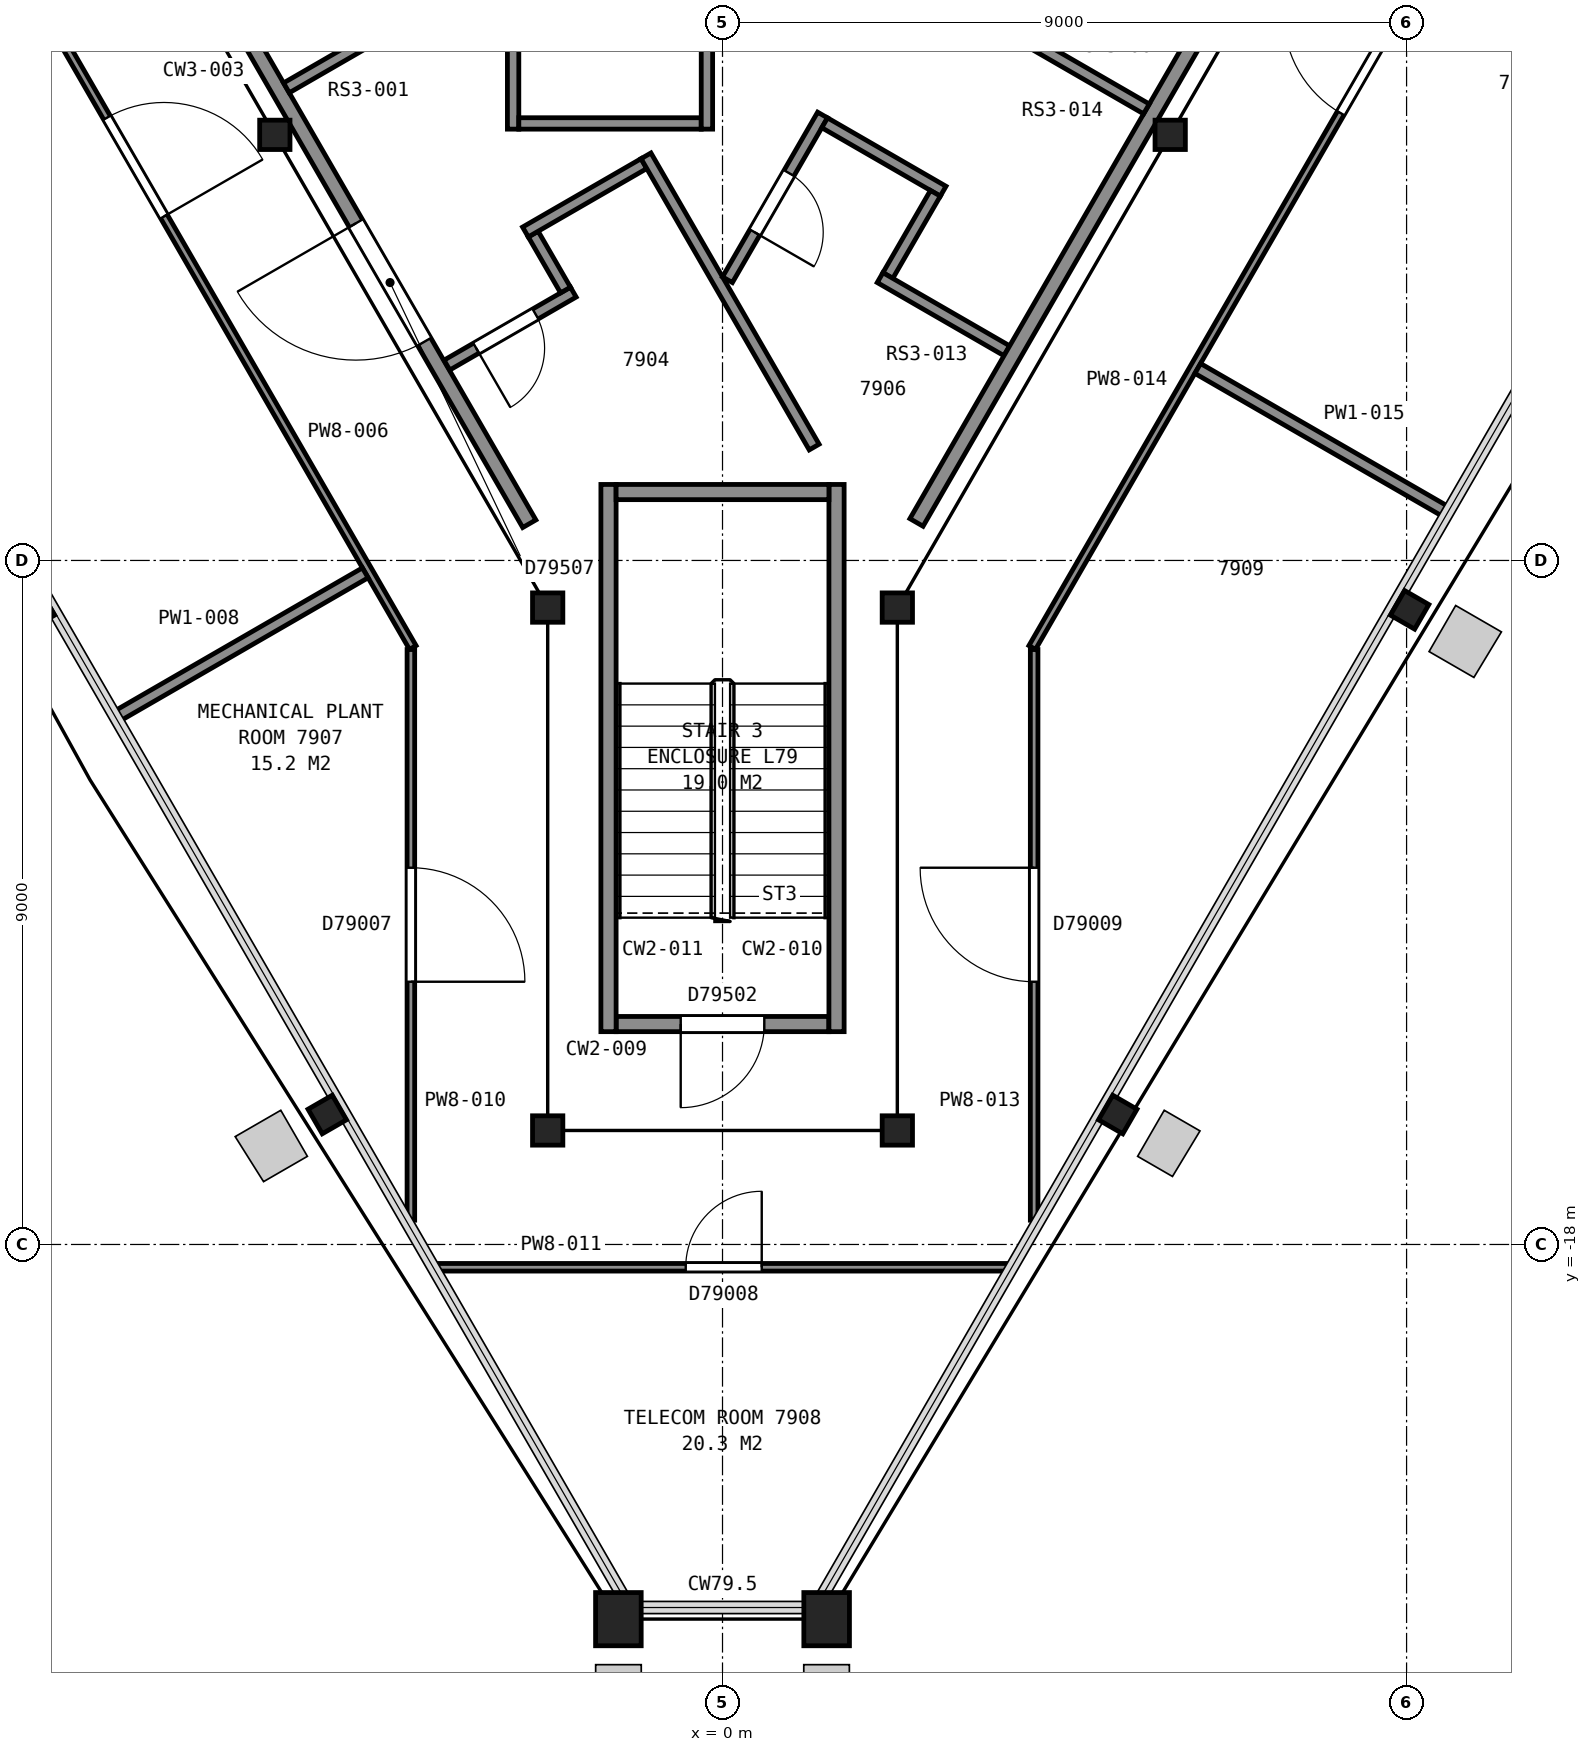
"""IFC4 building model, lengths in metres.
Left out: names, types, materials, properties, quantities, classifications, styles, units other than length and angle.
Written with IfcOpenShell. Run it as: python <this file> out.ifc"""

import sys

from ifc_helpers import new_model, si_unit, direction, frame, frame_2d, origin, origin_2d, place, context, subcontext, project, spatial, rectangle, hollow_rectangle, i_section, extrude, element, fill, save


model = new_model("IFC4")
c1 = context("Model", 3, precision=1e-05, world=origin(), true_north=direction((0.0, 1.0)))
c2 = subcontext(c1, "Body", "Model", "MODEL_VIEW")
j1 = project(units=[si_unit("LENGTHUNIT", "METRE"), si_unit("PLANEANGLEUNIT", "RADIAN")], contexts=[c1])
p1 = place(None, origin())
s1 = spatial("IfcSite", under=j1, at=p1, CompositionType="ELEMENT")
p2 = place(p1, origin())
s2 = spatial("IfcBuilding", under=s1, at=p2, CompositionType="ELEMENT")
p3 = place(p2, frame((0.0, 0.0, 312.6)))
s3 = spatial("IfcBuildingStorey", under=s2, at=p3, CompositionType="ELEMENT", Elevation=312.6)
for number, where, z_axis, x_axis in (
    (1, (-9.04, -9.65, 0.0), (0.0, 0.0, 1.0), (-0.5, 0.866, 0.0)),
    (2, (-5.2, -16.29, 0.0), (0.0, 0.0, 1.0), (-0.5, 0.866, 0.0)),
):
    element("IfcColumn", number, at=place(p3, frame(where, z_axis=z_axis, x_axis=x_axis)), inside=s3, PredefinedType="COLUMN", context=c2, shape_type="SweptSolid", body=[
        extrude(i_section(OverallWidth=0.373, OverallDepth=0.368, WebThickness=0.015, FlangeThickness=0.024, FilletRadius=0.015, at=origin_2d()), origin(), (0.0, 0.0, 1.0), 4.2),
    ])
for number, where, z_axis, x_axis in (
    (3, (-1.37, -22.93, 0.0), (0.0, 0.0, 1.0), (-1.0, 0.0, 0.0)),
    (4, (1.37, -22.93, 0.0), (0.0, 0.0, 1.0), (-1.0, 0.0, 0.0)),
):
    element("IfcColumn", number, at=place(p3, frame(where, z_axis=z_axis, x_axis=x_axis)), inside=s3, PredefinedType="COLUMN", context=c2, shape_type="SweptSolid", body=[
        extrude(hollow_rectangle(XDim=0.6, YDim=0.7, WallThickness=0.04, at=origin_2d()), origin(), (0.0, 0.0, 1.0), 4.2),
    ])
for number, where, z_axis, x_axis in (
    (5, (5.2, -16.29, 0.0), (0.0, 0.0, 1.0), (-0.5, -0.866, 0.0)),
    (6, (9.04, -9.65, 0.0), (0.0, 0.0, 1.0), (-0.5, -0.866, 0.0)),
):
    element("IfcColumn", number, at=place(p3, frame(where, z_axis=z_axis, x_axis=x_axis)), inside=s3, PredefinedType="COLUMN", context=c2, shape_type="SweptSolid", body=[
        extrude(i_section(OverallWidth=0.373, OverallDepth=0.368, WebThickness=0.015, FlangeThickness=0.024, FilletRadius=0.015, at=origin_2d()), origin(), (0.0, 0.0, 1.0), 4.2),
    ])
for number, where, z_axis, x_axis in (
    (7, (-5.89, -3.4, 0.0), (0.0, 0.0, 1.0), (1.0, 0.0, 0.0)),
    (8, (-2.3, -9.62, 0.0), (0.0, 0.0, 1.0), (1.0, 0.0, 0.0)),
    (9, (-2.3, -16.5, 0.0), (0.0, 0.0, 1.0), (-1.0, 0.0, 0.0)),
    (10, (2.3, -16.5, 0.0), (0.0, 0.0, 1.0), (-1.0, 0.0, 0.0)),
    (11, (2.3, -9.62, 0.0), (0.0, 0.0, 1.0), (1.0, 0.0, 0.0)),
    (12, (5.89, -3.4, 0.0), (0.0, 0.0, 1.0), (1.0, 0.0, 0.0)),
):
    element("IfcColumn", number, at=place(p3, frame(where, z_axis=z_axis, x_axis=x_axis)), inside=s3, PredefinedType="COLUMN", context=c2, shape_type="SweptSolid", body=[
        extrude(i_section(OverallWidth=0.399, OverallDepth=0.386, WebThickness=0.021, FlangeThickness=0.033, FilletRadius=0.015, at=origin_2d()), origin(), (0.0, 0.0, 1.0), 4.2),
    ])
p4 = place(p3, frame((-1.4, -15.1, 0.0), z_axis=(0.0, 0.0, 1.0), x_axis=(1.0, 0.0, 0.0)))
e13 = element("IfcWall", 13, at=p4, inside=s3, PredefinedType="PARTITIONING", context=c2, shape_type="SweptSolid", body=[
    extrude(rectangle(XDim=2.8, YDim=0.2, at=frame_2d((1.4, 0.0))), origin(), (0.0, 0.0, 1.0), 3.95),
])
p5 = place(p4, frame((0.85, 0.0, 0.0)))
e14 = element("IfcOpeningElement", 14, at=p5, cuts=e13, PredefinedType="OPENING", context=c2, shape_type="SweptSolid", body=[
    extrude(rectangle(XDim=1.1, YDim=2.1, at=frame_2d((0.55, 1.05))), frame((0.0, 0.11, 0.0), z_axis=(0.0, -1.0, 0.0), x_axis=(1.0, 0.0, 0.0)), (0.0, 0.0, 1.0), 0.22),
])
for number, where, z_axis, x_axis in (
    (15, (1.5, -8.0, 0.0), (0.0, 0.0, 1.0), (0.0, -1.0, 0.0)),
    (16, (-1.5, -8.0, 0.0), (0.0, 0.0, 1.0), (0.0, -1.0, 0.0)),
):
    element("IfcWall", number, at=place(p3, frame(where, z_axis=z_axis, x_axis=x_axis)), inside=s3, PredefinedType="PARTITIONING", context=c2, shape_type="SweptSolid", body=[
        extrude(rectangle(XDim=7.2, YDim=0.2, at=frame_2d((3.6, 0.0))), origin(), (0.0, 0.0, 1.0), 3.95),
    ])
p6 = place(p3, frame((-1.4, -8.1, 0.0), z_axis=(0.0, 0.0, 1.0), x_axis=(1.0, 0.0, 0.0)))
e17 = element("IfcWall", 17, at=p6, inside=s3, PredefinedType="PARTITIONING", context=c2, shape_type="SweptSolid", body=[
    extrude(rectangle(XDim=2.8, YDim=0.2, at=frame_2d((1.4, 0.0))), origin(), (0.0, 0.0, 1.0), 3.95),
])
p7 = place(p3, frame((-7.141, -0.551, 0.0), z_axis=(0.0, 0.0, 1.0), x_axis=(0.499992795234, -0.866029563418, 0.0)))
e18 = element("IfcWall", 18, at=p7, inside=s3, PredefinedType="PARTITIONING", context=c2, shape_type="SweptSolid", body=[
    extrude(rectangle(XDim=9.198, YDim=0.2, at=frame_2d((4.599, 0.0))), origin(), (0.0, 0.0, 1.0), 3.95),
])
p8 = place(p7, frame((4.634, 0.0, 0.0)))
e19 = element("IfcOpeningElement", 19, at=p8, cuts=e18, PredefinedType="OPENING", context=c2, shape_type="SweptSolid", body=[
    extrude(rectangle(XDim=1.8, YDim=2.1, at=frame_2d((0.9, 1.05))), frame((0.0, 0.11, 0.0), z_axis=(0.0, -1.0, 0.0), x_axis=(1.0, 0.0, 0.0)), (0.0, 0.0, 1.0), 0.22),
])
p9 = place(p3, frame((-5.737, -2.782, 0.0), z_axis=(0.0, 0.0, 1.0), x_axis=(0.866000843773, 0.500042536776, 0.0)))
e20 = element("IfcWall", 20, at=p9, inside=s3, PredefinedType="PARTITIONING", context=c2, shape_type="SweptSolid", body=[
    extrude(rectangle(XDim=2.025, YDim=0.15, at=frame_2d((1.012, 0.0))), origin(), (0.0, 0.0, 1.0), 3.95),
])
p10 = place(p3, frame((-1.963, -5.469, 0.0), z_axis=(0.0, 0.0, 1.0), x_axis=(-0.866043720474, -0.49996827322, 0.0)))
e21 = element("IfcWall", 21, at=p10, inside=s3, PredefinedType="PARTITIONING", context=c2, shape_type="SweptSolid", body=[
    extrude(rectangle(XDim=1.92, YDim=0.15, at=frame_2d((0.96, 0.0))), origin(), (0.0, 0.0, 1.0), 3.95),
])
p11 = place(p10, frame((0.575, 0.0, 0.0)))
e22 = element("IfcOpeningElement", 22, at=p11, cuts=e21, PredefinedType="OPENING", context=c2, shape_type="SweptSolid", body=[
    extrude(rectangle(XDim=0.9, YDim=2.1, at=frame_2d((0.45, 1.05))), frame((0.0, 0.085, 0.0), z_axis=(0.0, -1.0, 0.0), x_axis=(1.0, 0.0, 0.0)), (0.0, 0.0, 1.0), 0.17),
])
p12 = place(p3, frame((-2.755, -0.102, 0.0), z_axis=(0.0, 0.0, 1.0), x_axis=(0.0, -1.0, 0.0)))
e23 = element("IfcWall", 23, at=p12, inside=s3, PredefinedType="PARTITIONING", context=c2, shape_type="SweptSolid", body=[
    extrude(rectangle(XDim=3.223, YDim=0.15, at=frame_2d((1.611, 0.0))), origin(), (0.0, 0.0, 1.0), 3.95),
])
p13 = place(p12, frame((1.148, 0.0, 0.0)))
e24 = element("IfcOpeningElement", 24, at=p13, cuts=e23, PredefinedType="OPENING", context=c2, shape_type="SweptSolid", body=[
    extrude(rectangle(XDim=0.9, YDim=2.1, at=frame_2d((0.45, 1.05))), frame((0.0, 0.085, 0.0), z_axis=(0.0, -1.0, 0.0), x_axis=(1.0, 0.0, 0.0)), (0.0, 0.0, 1.0), 0.17),
])
p14 = place(p3, frame((-2.68, -3.25, 0.0), z_axis=(0.0, 0.0, 1.0), x_axis=(1.0, 0.0, 0.0)))
e25 = element("IfcWall", 25, at=p14, inside=s3, PredefinedType="PARTITIONING", context=c2, shape_type="SweptSolid", body=[
    extrude(rectangle(XDim=2.4, YDim=0.15, at=frame_2d((1.2, 0.0))), origin(), (0.0, 0.0, 1.0), 3.95),
])
p15 = place(p3, frame((-2.49, -4.706, 0.0), z_axis=(0.0, 0.0, 1.0), x_axis=(0.500062241894, -0.865989465428, 0.0)))
e26 = element("IfcWall", 26, at=p15, inside=s3, PredefinedType="PARTITIONING", context=c2, shape_type="SweptSolid", body=[
    extrude(rectangle(XDim=0.85, YDim=0.15, at=frame_2d((0.425, 0.0))), origin(), (0.0, 0.0, 1.0), 3.95),
])
p16 = place(p3, frame((-2.593, -4.678, 0.0), z_axis=(0.0, 0.0, 1.0), x_axis=(0.866081705922, 0.499902469156, 0.0)))
e27 = element("IfcWall", 27, at=p16, inside=s3, PredefinedType="PARTITIONING", context=c2, shape_type="SweptSolid", body=[
    extrude(rectangle(XDim=1.8, YDim=0.15, at=frame_2d((0.9, 0.0))), origin(), (0.0, 0.0, 1.0), 3.95),
])
p17 = place(p3, frame((-1.007, -3.676, 0.0), z_axis=(0.0, 0.0, 1.0), x_axis=(0.500037662692, -0.866003658127, 0.0)))
e28 = element("IfcWall", 28, at=p17, inside=s3, PredefinedType="PARTITIONING", context=c2, shape_type="SweptSolid", body=[
    extrude(rectangle(XDim=4.425, YDim=0.15, at=frame_2d((2.212, 0.0))), origin(), (0.0, 0.0, 1.0), 3.95),
])
p18 = place(p3, frame((-0.205, -3.325, 0.0), z_axis=(0.0, 0.0, 1.0), x_axis=(0.0, 1.0, 0.0)))
e29 = element("IfcWall", 29, at=p18, inside=s3, PredefinedType="PARTITIONING", context=c2, shape_type="SweptSolid", body=[
    extrude(rectangle(XDim=3.223, YDim=0.15, at=frame_2d((1.611, 0.0))), origin(), (0.0, 0.0, 1.0), 3.95),
])
p19 = place(p3, frame((1.316, -3.139, 0.0), z_axis=(0.0, 0.0, 1.0), x_axis=(-0.500063042646, -0.865989003036, 0.0)))
e30 = element("IfcWall", 30, at=p19, inside=s3, PredefinedType="PARTITIONING", context=c2, shape_type="SweptSolid", body=[
    extrude(rectangle(XDim=2.503, YDim=0.15, at=frame_2d((1.251, 0.0))), origin(), (0.0, 0.0, 1.0), 3.95),
])
p20 = place(p19, frame((0.883, 0.0, 0.0)))
e31 = element("IfcOpeningElement", 31, at=p20, cuts=e30, PredefinedType="OPENING", context=c2, shape_type="SweptSolid", body=[
    extrude(rectangle(XDim=0.9, YDim=2.1, at=frame_2d((0.45, 1.05))), frame((0.0, 0.085, 0.0), z_axis=(0.0, -1.0, 0.0), x_axis=(1.0, 0.0, 0.0)), (0.0, 0.0, 1.0), 0.17),
])
p21 = place(p3, frame((1.344, -3.241, 0.0), z_axis=(0.0, 0.0, 1.0), x_axis=(0.865989075817, -0.500062916607, 0.0)))
e32 = element("IfcWall", 32, at=p21, inside=s3, PredefinedType="PARTITIONING", context=c2, shape_type="SweptSolid", body=[
    extrude(rectangle(XDim=1.8, YDim=0.15, at=frame_2d((0.9, 0.0))), origin(), (0.0, 0.0, 1.0), 3.95),
])
p22 = place(p3, frame((2.176, -5.251, 0.0), z_axis=(0.0, 0.0, 1.0), x_axis=(0.500173430036, 0.86592525075, 0.0)))
e33 = element("IfcWall", 33, at=p22, inside=s3, PredefinedType="PARTITIONING", context=c2, shape_type="SweptSolid", body=[
    extrude(rectangle(XDim=1.25, YDim=0.15, at=frame_2d((0.625, 0.0))), origin(), (0.0, 0.0, 1.0), 3.95),
])
p23 = place(p3, frame((2.073, -5.279, 0.0), z_axis=(0.0, 0.0, 1.0), x_axis=(0.86609690551, -0.499876134923, 0.0)))
e34 = element("IfcWall", 34, at=p23, inside=s3, PredefinedType="PARTITIONING", context=c2, shape_type="SweptSolid", body=[
    extrude(rectangle(XDim=1.925, YDim=0.15, at=frame_2d((0.963, 0.0))), origin(), (0.0, 0.0, 1.0), 3.95),
])
p24 = place(p3, frame((2.552, -8.5, 0.0), z_axis=(0.0, 0.0, 1.0), x_axis=(0.499981156672, 0.866036282712, 0.0)))
e35 = element("IfcWall", 35, at=p24, inside=s3, PredefinedType="PARTITIONING", context=c2, shape_type="SweptSolid", body=[
    extrude(rectangle(XDim=13.915, YDim=0.2, at=frame_2d((6.957, 0.0))), origin(), (0.0, 0.0, 1.0), 3.95),
])
p25 = place(p3, frame((3.738, -1.997, 0.0), z_axis=(0.0, 0.0, 1.0), x_axis=(0.865913749133, -0.500193341681, 0.0)))
e36 = element("IfcWall", 36, at=p25, inside=s3, PredefinedType="PARTITIONING", context=c2, shape_type="SweptSolid", body=[
    extrude(rectangle(XDim=2.124, YDim=0.15, at=frame_2d((1.062, 0.0))), origin(), (0.0, 0.0, 1.0), 3.95),
])
p26 = place(p3, frame((-4.075, -10.145, 0.0), z_axis=(0.0, 0.0, 1.0), x_axis=(-0.499912942625, 0.866075660549, 0.0)))
e37 = element("IfcWall", 37, at=p26, inside=s3, PredefinedType="PARTITIONING", context=c2, shape_type="SweptSolid", body=[
    extrude(rectangle(XDim=13.499, YDim=0.1, at=frame_2d((6.749, 0.0))), origin(), (0.0, 0.0, 1.0), 3.297),
])
p27 = place(p26, frame((6.548, 0.0, 0.0)))
e38 = element("IfcOpeningElement", 38, at=p27, cuts=e37, PredefinedType="OPENING", context=c2, shape_type="SweptSolid", body=[
    extrude(rectangle(XDim=1.5, YDim=2.1, at=frame_2d((0.75, 1.05))), frame((0.0, 0.06, 0.0), z_axis=(0.0, -1.0, 0.0), x_axis=(1.0, 0.0, 0.0)), (0.0, 0.0, 1.0), 0.12),
])
p28 = place(p3, frame((-7.975, -11.054, 0.0), z_axis=(0.0, 0.0, 1.0), x_axis=(0.865981276422, 0.500076423046, 0.0)))
e39 = element("IfcWall", 39, at=p28, inside=s3, PredefinedType="PARTITIONING", context=c2, shape_type="SweptSolid", body=[
    extrude(rectangle(XDim=3.781, YDim=0.15, at=frame_2d((1.891, 0.0))), origin(), (0.0, 0.0, 1.0), 3.297),
])
p29 = place(p3, frame((-4.1, -17.68, 0.0), z_axis=(0.0, 0.0, 1.0), x_axis=(0.0, 1.0, 0.0)))
e40 = element("IfcWall", 40, at=p29, inside=s3, PredefinedType="PARTITIONING", context=c2, shape_type="SweptSolid", body=[
    extrude(rectangle(XDim=7.508, YDim=0.1, at=frame_2d((3.754, 0.0))), origin(), (0.0, 0.0, 1.0), 3.297),
])
p30 = place(p29, frame((3.137, 0.0, 0.0)))
e41 = element("IfcOpeningElement", 41, at=p30, cuts=e40, PredefinedType="OPENING", context=c2, shape_type="SweptSolid", body=[
    extrude(rectangle(XDim=1.5, YDim=2.1, at=frame_2d((0.75, 1.05))), frame((0.0, 0.06, 0.0), z_axis=(0.0, -1.0, 0.0), x_axis=(1.0, 0.0, 0.0)), (0.0, 0.0, 1.0), 0.12),
])
p31 = place(p3, frame((3.763, -18.3, 0.0), z_axis=(0.0, 0.0, 1.0), x_axis=(-1.0, 0.0, 0.0)))
e42 = element("IfcWall", 42, at=p31, inside=s3, PredefinedType="PARTITIONING", context=c2, shape_type="SweptSolid", body=[
    extrude(rectangle(XDim=7.526, YDim=0.1, at=frame_2d((3.763, 0.0))), origin(), (0.0, 0.0, 1.0), 3.297),
])
p32 = place(p31, frame((3.247, 0.0, 0.0)))
e43 = element("IfcOpeningElement", 43, at=p32, cuts=e42, PredefinedType="OPENING", context=c2, shape_type="SweptSolid", body=[
    extrude(rectangle(XDim=1.0, YDim=2.1, at=frame_2d((0.5, 1.05))), frame((0.0, 0.06, 0.0), z_axis=(0.0, -1.0, 0.0), x_axis=(1.0, 0.0, 0.0)), (0.0, 0.0, 1.0), 0.12),
])
p33 = place(p3, frame((4.1, -10.172, 0.0), z_axis=(0.0, 0.0, 1.0), x_axis=(0.0, -1.0, 0.0)))
e44 = element("IfcWall", 44, at=p33, inside=s3, PredefinedType="PARTITIONING", context=c2, shape_type="SweptSolid", body=[
    extrude(rectangle(XDim=7.508, YDim=0.1, at=frame_2d((3.754, 0.0))), origin(), (0.0, 0.0, 1.0), 3.297),
])
p34 = place(p33, frame((2.871, 0.0, 0.0)))
e45 = element("IfcOpeningElement", 45, at=p34, cuts=e44, PredefinedType="OPENING", context=c2, shape_type="SweptSolid", body=[
    extrude(rectangle(XDim=1.5, YDim=2.1, at=frame_2d((0.75, 1.05))), frame((0.0, 0.06, 0.0), z_axis=(0.0, -1.0, 0.0), x_axis=(1.0, 0.0, 0.0)), (0.0, 0.0, 1.0), 0.12),
])
p35 = place(p3, frame((10.823, 1.545, 0.0), z_axis=(0.0, 0.0, 1.0), x_axis=(-0.499912942625, -0.866075660549, 0.0)))
e46 = element("IfcWall", 46, at=p35, inside=s3, PredefinedType="PARTITIONING", context=c2, shape_type="SweptSolid", body=[
    extrude(rectangle(XDim=13.499, YDim=0.1, at=frame_2d((6.749, 0.0))), origin(), (0.0, 0.0, 1.0), 3.297),
])
p36 = place(p35, frame((3.88, 0.0, 0.0)))
e47 = element("IfcOpeningElement", 47, at=p36, cuts=e46, PredefinedType="OPENING", context=c2, shape_type="SweptSolid", body=[
    extrude(rectangle(XDim=1.5, YDim=2.1, at=frame_2d((0.75, 1.05))), frame((0.0, 0.06, 0.0), z_axis=(0.0, -1.0, 0.0), x_axis=(1.0, 0.0, 0.0)), (0.0, 0.0, 1.0), 0.12),
])
p37 = place(p3, frame((6.252, -6.474, 0.0), z_axis=(0.0, 0.0, 1.0), x_axis=(0.866085610259, -0.499895704825, 0.0)))
e48 = element("IfcWall", 48, at=p37, inside=s3, PredefinedType="PARTITIONING", context=c2, shape_type="SweptSolid", body=[
    extrude(rectangle(XDim=3.781, YDim=0.15, at=frame_2d((1.891, 0.0))), origin(), (0.0, 0.0, 1.0), 3.297),
])
p38 = place(p5, origin())
e49 = element("IfcDoor", 49, at=p38, inside=s3, OperationType="SINGLE_SWING_LEFT", PredefinedType="DOOR", context=c2, shape_type="SweptSolid", body=[
    extrude(rectangle(XDim=1.1, YDim=2.1, at=frame_2d((0.55, 1.05))), frame((0.0, 0.025, 0.0), z_axis=(0.0, -1.0, 0.0), x_axis=(1.0, 0.0, 0.0)), (0.0, 0.0, 1.0), 0.05),
])
fill(e14, e49)
p39 = place(p8, origin())
e50 = element("IfcDoor", 50, at=p39, inside=s3, OperationType="DOUBLE_DOOR_SINGLE_SWING", PredefinedType="DOOR", context=c2, shape_type="SweptSolid", body=[
    extrude(rectangle(XDim=1.8, YDim=2.1, at=frame_2d((0.9, 1.05))), frame((0.0, 0.025, 0.0), z_axis=(0.0, -1.0, 0.0), x_axis=(1.0, 0.0, 0.0)), (0.0, 0.0, 1.0), 0.05),
])
fill(e19, e50)
p40 = place(p11, origin())
e51 = element("IfcDoor", 51, at=p40, inside=s3, OperationType="SINGLE_SWING_RIGHT", PredefinedType="DOOR", context=c2, shape_type="SweptSolid", body=[
    extrude(rectangle(XDim=0.9, YDim=2.1, at=frame_2d((0.45, 1.05))), frame((0.0, 0.025, 0.0), z_axis=(0.0, -1.0, 0.0), x_axis=(1.0, 0.0, 0.0)), (0.0, 0.0, 1.0), 0.05),
])
fill(e22, e51)
p41 = place(p20, origin())
e52 = element("IfcDoor", 52, at=p41, inside=s3, OperationType="SINGLE_SWING_RIGHT", PredefinedType="DOOR", context=c2, shape_type="SweptSolid", body=[
    extrude(rectangle(XDim=0.9, YDim=2.1, at=frame_2d((0.45, 1.05))), frame((0.0, 0.025, 0.0), z_axis=(0.0, -1.0, 0.0), x_axis=(1.0, 0.0, 0.0)), (0.0, 0.0, 1.0), 0.05),
])
fill(e31, e52)
p42 = place(p27, origin())
e53 = element("IfcDoor", 53, at=p42, inside=s3, OperationType="DOUBLE_DOOR_SINGLE_SWING", PredefinedType="DOOR", context=c2, shape_type="SweptSolid", body=[
    extrude(rectangle(XDim=1.5, YDim=2.1, at=frame_2d((0.75, 1.05))), frame((0.0, 0.025, 0.0), z_axis=(0.0, -1.0, 0.0), x_axis=(1.0, 0.0, 0.0)), (0.0, 0.0, 1.0), 0.05),
])
fill(e38, e53)
p43 = place(p30, origin())
e54 = element("IfcDoor", 54, at=p43, inside=s3, OperationType="DOUBLE_DOOR_SINGLE_SWING", PredefinedType="DOOR", context=c2, shape_type="SweptSolid", body=[
    extrude(rectangle(XDim=1.5, YDim=2.1, at=frame_2d((0.75, 1.05))), frame((0.0, 0.025, 0.0), z_axis=(0.0, -1.0, 0.0), x_axis=(1.0, 0.0, 0.0)), (0.0, 0.0, 1.0), 0.05),
])
fill(e41, e54)
p44 = place(p32, origin())
e55 = element("IfcDoor", 55, at=p44, inside=s3, OperationType="SINGLE_SWING_LEFT", PredefinedType="DOOR", context=c2, shape_type="SweptSolid", body=[
    extrude(rectangle(XDim=1.0, YDim=2.1, at=frame_2d((0.5, 1.05))), frame((0.0, 0.025, 0.0), z_axis=(0.0, -1.0, 0.0), x_axis=(1.0, 0.0, 0.0)), (0.0, 0.0, 1.0), 0.05),
])
fill(e43, e55)
p45 = place(p34, origin())
e56 = element("IfcDoor", 56, at=p45, inside=s3, OperationType="DOUBLE_DOOR_SINGLE_SWING", PredefinedType="DOOR", context=c2, shape_type="SweptSolid", body=[
    extrude(rectangle(XDim=1.5, YDim=2.1, at=frame_2d((0.75, 1.05))), frame((0.0, 0.025, 0.0), z_axis=(0.0, -1.0, 0.0), x_axis=(1.0, 0.0, 0.0)), (0.0, 0.0, 1.0), 0.05),
])
fill(e45, e56)
p46 = place(p36, origin())
e57 = element("IfcDoor", 57, at=p46, inside=s3, OperationType="DOUBLE_DOOR_SINGLE_SWING", PredefinedType="DOOR", context=c2, shape_type="SweptSolid", body=[
    extrude(rectangle(XDim=1.5, YDim=2.1, at=frame_2d((0.75, 1.05))), frame((0.0, 0.025, 0.0), z_axis=(0.0, -1.0, 0.0), x_axis=(1.0, 0.0, 0.0)), (0.0, 0.0, 1.0), 0.05),
])
fill(e47, e57)
save(model, sys.argv[1])
